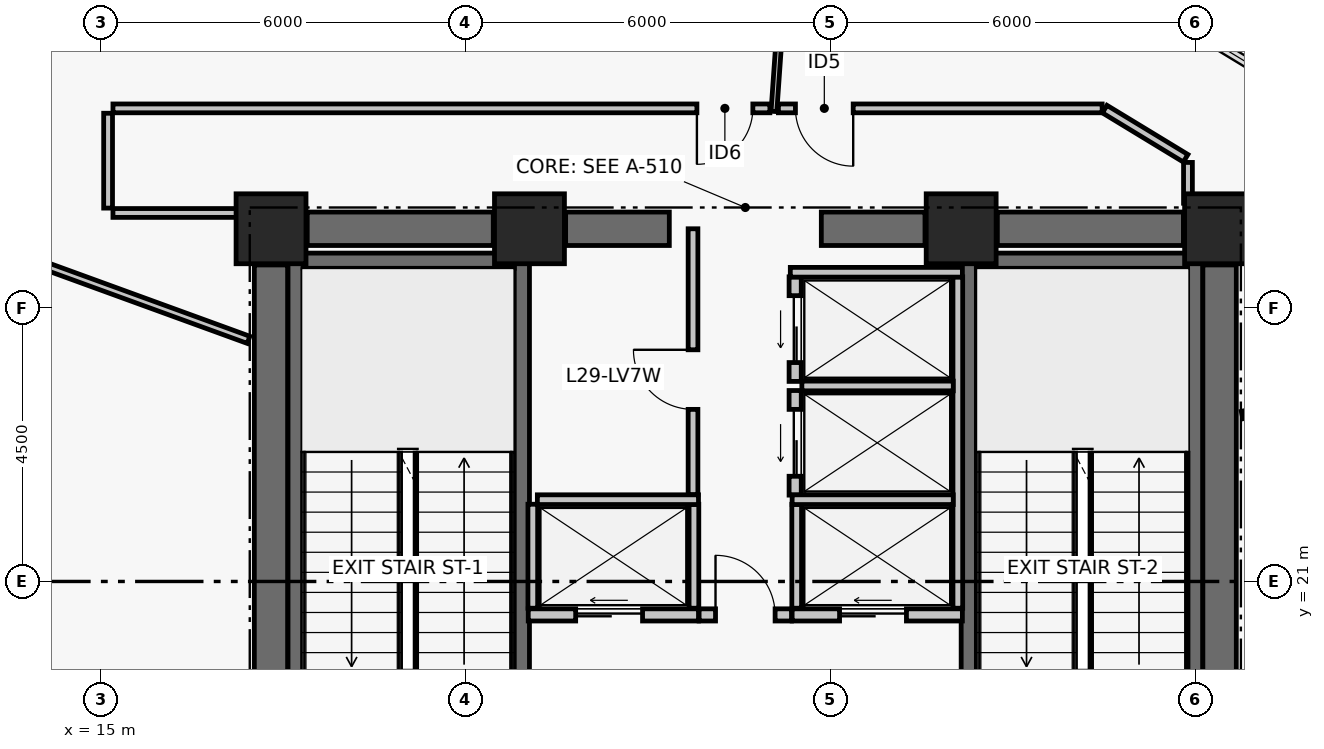
"""IFC4 building model, lengths in metres.
Left out: names, types, materials, properties, quantities, classifications, styles, units other than length and angle.
Written with IfcOpenShell. Run it as: python <this file> out.ifc"""

import sys

from ifc_helpers import new_model, si_unit, direction, frame, frame_2d, origin, origin_2d, place, context, subcontext, project, spatial, rectangle, extrude, element, fill, save


model = new_model("IFC4")
c1 = context("Model", 3, precision=1e-05, world=origin(), true_north=direction((0.0, 1.0)))
c2 = subcontext(c1, "Body", "Model", "MODEL_VIEW")
j1 = project(units=[si_unit("LENGTHUNIT", "METRE"), si_unit("PLANEANGLEUNIT", "RADIAN")], contexts=[c1])
p1 = place(None, origin())
s1 = spatial("IfcSite", under=j1, at=p1, CompositionType="ELEMENT")
p2 = place(p1, origin())
s2 = spatial("IfcBuilding", under=s1, at=p2, CompositionType="ELEMENT")
p3 = place(p2, frame((0.0, 0.0, 118.86)))
s3 = spatial("IfcBuildingStorey", under=s2, at=p3, CompositionType="ELEMENT", Elevation=118.86)
for number, where, z_axis, x_axis in (
    (1, (17.8, 26.8, 0.0), (0.0, 0.0, 1.0), (1.0, 0.0, 0.0)),
    (2, (22.05, 26.8, 0.0), (0.0, 0.0, 1.0), (1.0, 0.0, 0.0)),
    (3, (29.15, 26.8, 0.0), (0.0, 0.0, 1.0), (1.0, 0.0, 0.0)),
    (4, (33.4, 26.8, 0.0), (0.0, 0.0, 1.0), (1.0, 0.0, 0.0)),
):
    element("IfcColumn", number, at=place(p3, frame(where, z_axis=z_axis, x_axis=x_axis)), inside=s3, PredefinedType="COLUMN", context=c2, shape_type="SweptSolid", body=[
        extrude(rectangle(XDim=1.15, YDim=1.15, at=origin_2d()), origin(), (0.0, 0.0, 1.0), 3.72),
    ])
p4 = place(p3, frame((18.395, 26.8, 0.0), z_axis=(0.0, 0.0, 1.0), x_axis=(1.0, 0.0, 0.0)))
e5 = element("IfcWall", 5, at=p4, inside=s3, PredefinedType="SHEAR", context=c2, shape_type="SweptSolid", body=[
    extrude(rectangle(XDim=3.06, YDim=0.55, at=frame_2d((1.53, 0.0))), origin(), (0.0, 0.0, 1.0), 3.47),
])
p5 = place(p3, frame((22.645, 26.8, 0.0), z_axis=(0.0, 0.0, 1.0), x_axis=(1.0, 0.0, 0.0)))
e6 = element("IfcWall", 6, at=p5, inside=s3, PredefinedType="SHEAR", context=c2, shape_type="SweptSolid", body=[
    extrude(rectangle(XDim=1.705, YDim=0.55, at=frame_2d((0.853, 0.0))), origin(), (0.0, 0.0, 1.0), 3.47),
])
p6 = place(p3, frame((26.85, 26.8, 0.0), z_axis=(0.0, 0.0, 1.0), x_axis=(1.0, 0.0, 0.0)))
e7 = element("IfcWall", 7, at=p6, inside=s3, PredefinedType="SHEAR", context=c2, shape_type="SweptSolid", body=[
    extrude(rectangle(XDim=1.705, YDim=0.55, at=frame_2d((0.853, 0.0))), origin(), (0.0, 0.0, 1.0), 3.47),
])
p7 = place(p3, frame((29.745, 26.8, 0.0), z_axis=(0.0, 0.0, 1.0), x_axis=(1.0, 0.0, 0.0)))
e8 = element("IfcWall", 8, at=p7, inside=s3, PredefinedType="SHEAR", context=c2, shape_type="SweptSolid", body=[
    extrude(rectangle(XDim=3.06, YDim=0.55, at=frame_2d((1.53, 0.0))), origin(), (0.0, 0.0, 1.0), 3.47),
])
for number, where, z_axis, x_axis in (
    (9, (17.8, 17.795, 0.0), (0.0, 0.0, 1.0), (0.0, 1.0, 0.0)),
    (10, (33.4, 17.795, 0.0), (0.0, 0.0, 1.0), (0.0, 1.0, 0.0)),
):
    element("IfcWall", number, at=place(p3, frame(where, z_axis=z_axis, x_axis=x_axis)), inside=s3, PredefinedType="SHEAR", context=c2, shape_type="SweptSolid", body=[
        extrude(rectangle(XDim=8.41, YDim=0.55, at=frame_2d((4.205, 0.0))), origin(), (0.0, 0.0, 1.0), 3.47),
    ])
p8 = place(p3, frame((18.204, 17.6, 0.0), z_axis=(0.0, 0.0, 1.0), x_axis=(0.0, 1.0, 0.0)))
e11 = element("IfcWall", 11, at=p8, inside=s3, PredefinedType="SHEAR", context=c2, shape_type="SweptSolid", body=[
    extrude(rectangle(XDim=8.8, YDim=0.25, at=frame_2d((4.4, 0.0))), origin(), (0.0, 0.0, 1.0), 3.47),
])
p9 = place(p3, frame((21.925, 17.6, 0.0), z_axis=(0.0, 0.0, 1.0), x_axis=(0.0, 1.0, 0.0)))
e12 = element("IfcWall", 12, at=p9, inside=s3, PredefinedType="SHEAR", context=c2, shape_type="SweptSolid", body=[
    extrude(rectangle(XDim=8.8, YDim=0.25, at=frame_2d((4.4, 0.0))), origin(), (0.0, 0.0, 1.0), 3.47),
])
p10 = place(p9, frame((0.35, 0.0, 0.0)))
e13 = element("IfcOpeningElement", 13, at=p10, cuts=e12, PredefinedType="OPENING", context=c2, shape_type="SweptSolid", body=[
    extrude(rectangle(XDim=1.05, YDim=2.08, at=frame_2d((0.525, 1.04))), frame((0.0, 0.135, 0.0), z_axis=(0.0, -1.0, 0.0), x_axis=(1.0, 0.0, 0.0)), (0.0, 0.0, 1.0), 0.27),
])
p11 = place(p3, frame((18.329, 26.275, 0.0), z_axis=(0.0, 0.0, 1.0), x_axis=(1.0, 0.0, 0.0)))
e14 = element("IfcWall", 14, at=p11, inside=s3, PredefinedType="SHEAR", context=c2, shape_type="SweptSolid", body=[
    extrude(rectangle(XDim=3.471, YDim=0.25, at=frame_2d((1.735, 0.0))), origin(), (0.0, 0.0, 1.0), 3.47),
])
p12 = place(p3, frame((29.275, 17.6, 0.0), z_axis=(0.0, 0.0, 1.0), x_axis=(0.0, 1.0, 0.0)))
e15 = element("IfcWall", 15, at=p12, inside=s3, PredefinedType="SHEAR", context=c2, shape_type="SweptSolid", body=[
    extrude(rectangle(XDim=8.8, YDim=0.25, at=frame_2d((4.4, 0.0))), origin(), (0.0, 0.0, 1.0), 3.47),
])
p13 = place(p12, frame((0.35, 0.0, 0.0)))
e16 = element("IfcOpeningElement", 16, at=p13, cuts=e15, PredefinedType="OPENING", context=c2, shape_type="SweptSolid", body=[
    extrude(rectangle(XDim=1.05, YDim=2.08, at=frame_2d((0.525, 1.04))), frame((0.0, 0.135, 0.0), z_axis=(0.0, -1.0, 0.0), x_axis=(1.0, 0.0, 0.0)), (0.0, 0.0, 1.0), 0.27),
])
p14 = place(p3, frame((32.996, 17.6, 0.0), z_axis=(0.0, 0.0, 1.0), x_axis=(0.0, 1.0, 0.0)))
e17 = element("IfcWall", 17, at=p14, inside=s3, PredefinedType="SHEAR", context=c2, shape_type="SweptSolid", body=[
    extrude(rectangle(XDim=8.8, YDim=0.25, at=frame_2d((4.4, 0.0))), origin(), (0.0, 0.0, 1.0), 3.47),
])
p15 = place(p3, frame((29.4, 26.275, 0.0), z_axis=(0.0, 0.0, 1.0), x_axis=(1.0, 0.0, 0.0)))
e18 = element("IfcWall", 18, at=p15, inside=s3, PredefinedType="SHEAR", context=c2, shape_type="SweptSolid", body=[
    extrude(rectangle(XDim=3.471, YDim=0.25, at=frame_2d((1.736, 0.0))), origin(), (0.0, 0.0, 1.0), 3.47),
])
p16 = place(p3, frame((24.84, 20.45, 0.0), z_axis=(0.0, 0.0, 1.0), x_axis=(1.0, 0.0, 0.0)))
e19 = element("IfcWall", 19, at=p16, inside=s3, PredefinedType="PARTITIONING", context=c2, shape_type="SweptSolid", body=[
    extrude(rectangle(XDim=1.52, YDim=0.2, at=frame_2d((0.76, 0.0))), origin(), (0.0, 0.0, 1.0), 3.47),
])
p17 = place(p16, frame((0.27, 0.0, 0.0)))
e20 = element("IfcOpeningElement", 20, at=p17, cuts=e19, PredefinedType="OPENING", context=c2, shape_type="SweptSolid", body=[
    extrude(rectangle(XDim=0.98, YDim=2.06, at=frame_2d((0.49, 1.03))), frame((0.0, 0.11, 0.0), z_axis=(0.0, -1.0, 0.0), x_axis=(1.0, 0.0, 0.0)), (0.0, 0.0, 1.0), 0.22),
])
p18 = place(p3, frame((22.03, 20.45, 0.0), z_axis=(0.0, 0.0, 1.0), x_axis=(1.0, 0.0, 0.0)))
e21 = element("IfcWall", 21, at=p18, inside=s3, PredefinedType="PARTITIONING", context=c2, shape_type="SweptSolid", body=[
    extrude(rectangle(XDim=2.8, YDim=0.2, at=frame_2d((1.4, 0.0))), origin(), (0.0, 0.0, 1.0), 3.47),
])
p19 = place(p18, frame((0.78, 0.0, 0.0)))
e22 = element("IfcOpeningElement", 22, at=p19, cuts=e21, PredefinedType="OPENING", context=c2, shape_type="SweptSolid", body=[
    extrude(rectangle(XDim=1.1, YDim=2.08, at=frame_2d((0.55, 1.04))), frame((0.0, 0.11, 0.0), z_axis=(0.0, -1.0, 0.0), x_axis=(1.0, 0.0, 0.0)), (0.0, 0.0, 1.0), 0.22),
])
p20 = place(p3, frame((26.37, 20.45, 0.0), z_axis=(0.0, 0.0, 1.0), x_axis=(1.0, 0.0, 0.0)))
e23 = element("IfcWall", 23, at=p20, inside=s3, PredefinedType="PARTITIONING", context=c2, shape_type="SweptSolid", body=[
    extrude(rectangle(XDim=2.8, YDim=0.2, at=frame_2d((1.4, 0.0))), origin(), (0.0, 0.0, 1.0), 3.47),
])
p21 = place(p20, frame((0.78, 0.0, 0.0)))
e24 = element("IfcOpeningElement", 24, at=p21, cuts=e23, PredefinedType="OPENING", context=c2, shape_type="SweptSolid", body=[
    extrude(rectangle(XDim=1.1, YDim=2.08, at=frame_2d((0.55, 1.04))), frame((0.0, 0.11, 0.0), z_axis=(0.0, -1.0, 0.0), x_axis=(1.0, 0.0, 0.0)), (0.0, 0.0, 1.0), 0.22),
])
p22 = place(p3, frame((26.42, 22.42, 0.0), z_axis=(0.0, 0.0, 1.0), x_axis=(0.0, 1.0, 0.0)))
e25 = element("IfcWall", 25, at=p22, inside=s3, PredefinedType="PARTITIONING", context=c2, shape_type="SweptSolid", body=[
    extrude(rectangle(XDim=1.72, YDim=0.2, at=frame_2d((0.86, 0.0))), origin(), (0.0, 0.0, 1.0), 3.47),
])
p23 = place(p22, frame((0.31, 0.0, 0.0)))
e26 = element("IfcOpeningElement", 26, at=p23, cuts=e25, PredefinedType="OPENING", context=c2, shape_type="SweptSolid", body=[
    extrude(rectangle(XDim=1.1, YDim=2.08, at=frame_2d((0.55, 1.04))), frame((0.0, 0.11, 0.0), z_axis=(0.0, -1.0, 0.0), x_axis=(1.0, 0.0, 0.0)), (0.0, 0.0, 1.0), 0.22),
])
p24 = place(p3, frame((26.42, 24.29, 0.0), z_axis=(0.0, 0.0, 1.0), x_axis=(0.0, 1.0, 0.0)))
e27 = element("IfcWall", 27, at=p24, inside=s3, PredefinedType="PARTITIONING", context=c2, shape_type="SweptSolid", body=[
    extrude(rectangle(XDim=1.72, YDim=0.2, at=frame_2d((0.86, 0.0))), origin(), (0.0, 0.0, 1.0), 3.47),
])
p25 = place(p24, frame((0.31, 0.0, 0.0)))
e28 = element("IfcOpeningElement", 28, at=p25, cuts=e27, PredefinedType="OPENING", context=c2, shape_type="SweptSolid", body=[
    extrude(rectangle(XDim=1.1, YDim=2.08, at=frame_2d((0.55, 1.04))), frame((0.0, 0.11, 0.0), z_axis=(0.0, -1.0, 0.0), x_axis=(1.0, 0.0, 0.0)), (0.0, 0.0, 1.0), 0.22),
])
for number, where, z_axis, x_axis in (
    (29, (22.105, 20.56, 0.0), (0.0, 0.0, 1.0), (0.0, 1.0, 0.0)),
    (30, (24.755, 20.56, 0.0), (0.0, 0.0, 1.0), (0.0, 1.0, 0.0)),
):
    element("IfcWall", number, at=place(p3, frame(where, z_axis=z_axis, x_axis=x_axis)), inside=s3, PredefinedType="PARTITIONING", context=c2, shape_type="SweptSolid", body=[
        extrude(rectangle(XDim=1.71, YDim=0.16, at=frame_2d((0.855, 0.0))), origin(), (0.0, 0.0, 1.0), 3.47),
    ])
p26 = place(p3, frame((22.18, 22.345, 0.0), z_axis=(0.0, 0.0, 1.0), x_axis=(1.0, 0.0, 0.0)))
e31 = element("IfcWall", 31, at=p26, inside=s3, PredefinedType="PARTITIONING", context=c2, shape_type="SweptSolid", body=[
    extrude(rectangle(XDim=2.65, YDim=0.16, at=frame_2d((1.325, 0.0))), origin(), (0.0, 0.0, 1.0), 3.47),
])
p27 = place(p3, frame((29.095, 20.56, 0.0), z_axis=(0.0, 0.0, 1.0), x_axis=(0.0, 1.0, 0.0)))
e32 = element("IfcWall", 32, at=p27, inside=s3, PredefinedType="PARTITIONING", context=c2, shape_type="SweptSolid", body=[
    extrude(rectangle(XDim=5.45, YDim=0.16, at=frame_2d((2.725, 0.0))), origin(), (0.0, 0.0, 1.0), 3.47),
])
p28 = place(p3, frame((26.445, 20.56, 0.0), z_axis=(0.0, 0.0, 1.0), x_axis=(0.0, 1.0, 0.0)))
e33 = element("IfcWall", 33, at=p28, inside=s3, PredefinedType="PARTITIONING", context=c2, shape_type="SweptSolid", body=[
    extrude(rectangle(XDim=1.71, YDim=0.16, at=frame_2d((0.855, 0.0))), origin(), (0.0, 0.0, 1.0), 3.47),
])
p29 = place(p3, frame((26.37, 22.345, 0.0), z_axis=(0.0, 0.0, 1.0), x_axis=(1.0, 0.0, 0.0)))
e34 = element("IfcWall", 34, at=p29, inside=s3, PredefinedType="PARTITIONING", context=c2, shape_type="SweptSolid", body=[
    extrude(rectangle(XDim=2.65, YDim=0.16, at=frame_2d((1.325, 0.0))), origin(), (0.0, 0.0, 1.0), 3.47),
])
p30 = place(p3, frame((26.53, 24.215, 0.0), z_axis=(0.0, 0.0, 1.0), x_axis=(1.0, 0.0, 0.0)))
e35 = element("IfcWall", 35, at=p30, inside=s3, PredefinedType="PARTITIONING", context=c2, shape_type="SweptSolid", body=[
    extrude(rectangle(XDim=2.49, YDim=0.16, at=frame_2d((1.245, 0.0))), origin(), (0.0, 0.0, 1.0), 3.47),
])
p31 = place(p3, frame((26.34, 26.085, 0.0), z_axis=(0.0, 0.0, 1.0), x_axis=(1.0, 0.0, 0.0)))
e36 = element("IfcWall", 36, at=p31, inside=s3, PredefinedType="PARTITIONING", context=c2, shape_type="SweptSolid", body=[
    extrude(rectangle(XDim=2.83, YDim=0.16, at=frame_2d((1.415, 0.0))), origin(), (0.0, 0.0, 1.0), 3.47),
])
p32 = place(p3, frame((24.74, 22.43, 0.0), z_axis=(0.0, 0.0, 1.0), x_axis=(0.0, 1.0, 0.0)))
e37 = element("IfcWall", 37, at=p32, inside=s3, PredefinedType="PARTITIONING", context=c2, shape_type="SweptSolid", body=[
    extrude(rectangle(XDim=4.37, YDim=0.16, at=frame_2d((2.185, 0.0))), origin(), (0.0, 0.0, 1.0), 2.6),
])
p33 = place(p32, frame((1.4, 0.0, 0.0)))
e38 = element("IfcOpeningElement", 38, at=p33, cuts=e37, PredefinedType="OPENING", context=c2, shape_type="SweptSolid", body=[
    extrude(rectangle(XDim=0.98, YDim=2.06, at=frame_2d((0.49, 1.03))), frame((0.0, 0.09, 0.0), z_axis=(0.0, -1.0, 0.0), x_axis=(1.0, 0.0, 0.0)), (0.0, 0.0, 1.0), 0.18),
])
p34 = place(p3, frame((33.74, 27.22, 0.0), z_axis=(0.0, 0.0, 1.0), x_axis=(-1.0, 0.0, 0.0)))
e39 = element("IfcWall", 39, at=p34, inside=s3, PredefinedType="PARTITIONING", context=c2, shape_type="SweptSolid", body=[
    extrude(rectangle(XDim=0.86, YDim=0.145, at=frame_2d((0.43, 0.0))), origin(), (0.0, 0.0, 1.0), 2.6),
])
p35 = place(p3, frame((32.88, 27.22, 0.0), z_axis=(0.0, 0.0, 1.0), x_axis=(0.0, 1.0, 0.0)))
e40 = element("IfcWall", 40, at=p35, inside=s3, PredefinedType="PARTITIONING", context=c2, shape_type="SweptSolid", body=[
    extrude(rectangle(XDim=0.671, YDim=0.145, at=frame_2d((0.335, 0.0))), origin(), (0.0, 0.0, 1.0), 2.6),
])
p36 = place(p3, frame((32.842, 27.96, 0.0), z_axis=(0.0, 0.0, 1.0), x_axis=(-0.854742818792, 0.519051744745, 0.0)))
e41 = element("IfcWall", 41, at=p36, inside=s3, PredefinedType="PARTITIONING", context=c2, shape_type="SweptSolid", body=[
    extrude(rectangle(XDim=1.558, YDim=0.145, at=frame_2d((0.779, 0.0))), origin(), (0.0, 0.0, 1.0), 3.05),
])
p37 = place(p3, frame((31.469, 28.78, 0.0), z_axis=(0.0, 0.0, 1.0), x_axis=(-1.0, 0.0, 0.0)))
e42 = element("IfcWall", 42, at=p37, inside=s3, PredefinedType="PARTITIONING", context=c2, shape_type="SweptSolid", body=[
    extrude(rectangle(XDim=5.324, YDim=0.145, at=frame_2d((2.662, 0.0))), origin(), (0.0, 0.0, 1.0), 3.05),
])
p38 = place(p37, frame((4.094, 0.0, 0.0)))
e43 = element("IfcOpeningElement", 43, at=p38, cuts=e42, PredefinedType="OPENING", context=c2, shape_type="SweptSolid", body=[
    extrude(rectangle(XDim=0.95, YDim=2.06, at=frame_2d((0.475, 1.03))), frame((0.0, 0.083, 0.0), z_axis=(0.0, -1.0, 0.0), x_axis=(1.0, 0.0, 0.0)), (0.0, 0.0, 1.0), 0.165),
])
p39 = place(p3, frame((26.004, 28.78, 0.0), z_axis=(0.0, 0.0, 1.0), x_axis=(-1.0, 0.0, 0.0)))
e44 = element("IfcWall", 44, at=p39, inside=s3, PredefinedType="PARTITIONING", context=c2, shape_type="SweptSolid", body=[
    extrude(rectangle(XDim=10.804, YDim=0.145, at=frame_2d((5.402, 0.0))), origin(), (0.0, 0.0, 1.0), 2.65),
])
p40 = place(p39, frame((0.28, 0.0, 0.0)))
e45 = element("IfcOpeningElement", 45, at=p40, cuts=e44, PredefinedType="OPENING", context=c2, shape_type="SweptSolid", body=[
    extrude(rectangle(XDim=0.92, YDim=2.05, at=frame_2d((0.46, 1.025))), frame((0.0, 0.083, 0.0), z_axis=(0.0, -1.0, 0.0), x_axis=(1.0, 0.0, 0.0)), (0.0, 0.0, 1.0), 0.165),
])
p41 = place(p3, frame((15.12, 28.7, 0.0), z_axis=(0.0, 0.0, 1.0), x_axis=(0.0, -1.0, 0.0)))
e46 = element("IfcWall", 46, at=p41, inside=s3, PredefinedType="PARTITIONING", context=c2, shape_type="SweptSolid", body=[
    extrude(rectangle(XDim=1.56, YDim=0.145, at=frame_2d((0.78, 0.0))), origin(), (0.0, 0.0, 1.0), 2.65),
])
p42 = place(p3, frame((15.2, 27.06, 0.0), z_axis=(0.0, 0.0, 1.0), x_axis=(1.0, 0.0, 0.0)))
e47 = element("IfcWall", 47, at=p42, inside=s3, PredefinedType="PARTITIONING", context=c2, shape_type="SweptSolid", body=[
    extrude(rectangle(XDim=2.18, YDim=0.145, at=frame_2d((1.09, 0.0))), origin(), (0.0, 0.0, 1.0), 2.65),
])
p43 = place(p3, frame((33.77, 23.737, 0.0), z_axis=(0.0, 0.0, 1.0), x_axis=(0.978144206175, 0.20792766032, 0.0)))
e48 = element("IfcWall", 48, at=p43, inside=s3, PredefinedType="PARTITIONING", context=c2, shape_type="SweptSolid", body=[
    extrude(rectangle(XDim=6.102, YDim=0.125, at=frame_2d((3.051, 0.0))), origin(), (0.0, 0.0, 1.0), 2.6),
])
p44 = place(p3, frame((26.071, 28.73, 0.0), z_axis=(0.0, 0.0, 1.0), x_axis=(0.069740179431, 0.997565189535, 0.0)))
e49 = element("IfcWall", 49, at=p44, inside=s3, PredefinedType="PARTITIONING", context=c2, shape_type="SweptSolid", body=[
    extrude(rectangle(XDim=4.698, YDim=0.095, at=frame_2d((2.349, 0.0))), origin(), (0.0, 0.0, 1.0), 2.9),
])
p45 = place(p3, frame((17.43, 24.974, 0.0), z_axis=(0.0, 0.0, 1.0), x_axis=(-0.939693782006, 0.342016952882, 0.0)))
e50 = element("IfcWall", 50, at=p45, inside=s3, PredefinedType="PARTITIONING", context=c2, shape_type="SweptSolid", body=[
    extrude(rectangle(XDim=6.369, YDim=0.125, at=frame_2d((3.185, 0.0))), origin(), (0.0, 0.0, 1.0), 2.6),
])
p46 = place(p17, origin())
e51 = element("IfcDoor", 51, at=p46, inside=s3, OperationType="SINGLE_SWING_LEFT", PredefinedType="DOOR", context=c2, shape_type="SweptSolid", body=[
    extrude(rectangle(XDim=0.98, YDim=2.06, at=frame_2d((0.49, 1.03))), frame((0.0, 0.025, 0.0), z_axis=(0.0, -1.0, 0.0), x_axis=(1.0, 0.0, 0.0)), (0.0, 0.0, 1.0), 0.05),
])
fill(e20, e51)
p47 = place(p19, origin())
e52 = element("IfcDoor", 52, at=p47, inside=s3, OperationType="DOUBLE_DOOR_SLIDING", PredefinedType="DOOR", context=c2, shape_type="SweptSolid", body=[
    extrude(rectangle(XDim=1.1, YDim=2.08, at=frame_2d((0.55, 1.04))), frame((0.0, 0.025, 0.0), z_axis=(0.0, -1.0, 0.0), x_axis=(1.0, 0.0, 0.0)), (0.0, 0.0, 1.0), 0.05),
])
fill(e22, e52)
p48 = place(p21, origin())
e53 = element("IfcDoor", 53, at=p48, inside=s3, OperationType="DOUBLE_DOOR_SLIDING", PredefinedType="DOOR", context=c2, shape_type="SweptSolid", body=[
    extrude(rectangle(XDim=1.1, YDim=2.08, at=frame_2d((0.55, 1.04))), frame((0.0, 0.025, 0.0), z_axis=(0.0, -1.0, 0.0), x_axis=(1.0, 0.0, 0.0)), (0.0, 0.0, 1.0), 0.05),
])
fill(e24, e53)
p49 = place(p23, origin())
e54 = element("IfcDoor", 54, at=p49, inside=s3, OperationType="DOUBLE_DOOR_SLIDING", PredefinedType="DOOR", context=c2, shape_type="SweptSolid", body=[
    extrude(rectangle(XDim=1.1, YDim=2.08, at=frame_2d((0.55, 1.04))), frame((0.0, 0.025, 0.0), z_axis=(0.0, -1.0, 0.0), x_axis=(1.0, 0.0, 0.0)), (0.0, 0.0, 1.0), 0.05),
])
fill(e26, e54)
p50 = place(p25, origin())
e55 = element("IfcDoor", 55, at=p50, inside=s3, OperationType="DOUBLE_DOOR_SLIDING", PredefinedType="DOOR", context=c2, shape_type="SweptSolid", body=[
    extrude(rectangle(XDim=1.1, YDim=2.08, at=frame_2d((0.55, 1.04))), frame((0.0, 0.025, 0.0), z_axis=(0.0, -1.0, 0.0), x_axis=(1.0, 0.0, 0.0)), (0.0, 0.0, 1.0), 0.05),
])
fill(e28, e55)
p51 = place(p33, origin())
e56 = element("IfcDoor", 56, at=p51, inside=s3, OperationType="SINGLE_SWING_RIGHT", PredefinedType="DOOR", context=c2, shape_type="SweptSolid", body=[
    extrude(rectangle(XDim=0.98, YDim=2.06, at=frame_2d((0.49, 1.03))), frame((0.0, 0.025, 0.0), z_axis=(0.0, -1.0, 0.0), x_axis=(1.0, 0.0, 0.0)), (0.0, 0.0, 1.0), 0.05),
])
fill(e38, e56)
p52 = place(p38, origin())
e57 = element("IfcDoor", 57, at=p52, inside=s3, OperationType="SINGLE_SWING_LEFT", PredefinedType="DOOR", context=c2, shape_type="SweptSolid", body=[
    extrude(rectangle(XDim=0.95, YDim=2.06, at=frame_2d((0.475, 1.03))), frame((0.0, 0.025, 0.0), z_axis=(0.0, -1.0, 0.0), x_axis=(1.0, 0.0, 0.0)), (0.0, 0.0, 1.0), 0.05),
])
fill(e43, e57)
p53 = place(p40, origin())
e58 = element("IfcDoor", 58, at=p53, inside=s3, OperationType="SINGLE_SWING_RIGHT", PredefinedType="DOOR", context=c2, shape_type="SweptSolid", body=[
    extrude(rectangle(XDim=0.92, YDim=2.05, at=frame_2d((0.46, 1.025))), frame((0.0, 0.025, 0.0), z_axis=(0.0, -1.0, 0.0), x_axis=(1.0, 0.0, 0.0)), (0.0, 0.0, 1.0), 0.05),
])
fill(e45, e58)
save(model, sys.argv[1])
